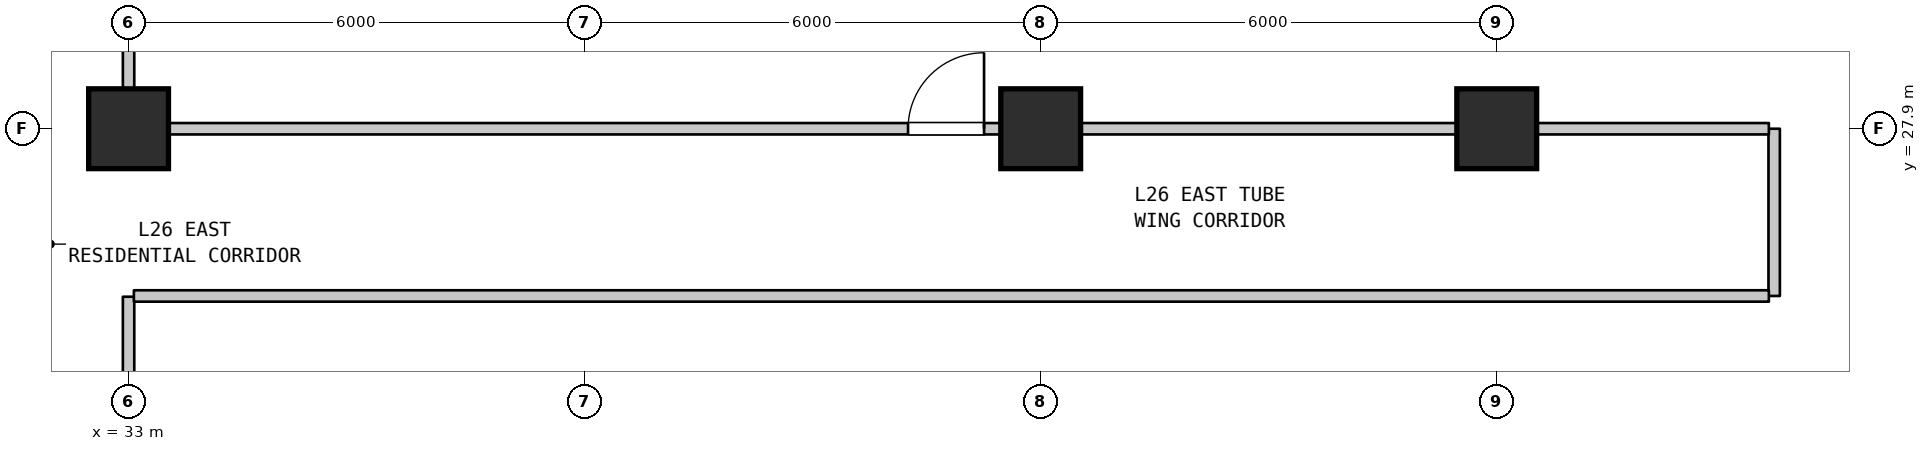
"""IFC4 building model, lengths in metres.
Left out: names, types, materials, properties, quantities, classifications, styles, units other than length and angle.
Written with IfcOpenShell. Run it as: python <this file> out.ifc"""

import sys

from ifc_helpers import new_model, si_unit, direction, frame, frame_2d, origin, origin_2d, place, context, subcontext, project, spatial, rectangle, extrude, element, fill, save


model = new_model("IFC4")
c1 = context("Model", 3, precision=1e-05, world=origin(), true_north=direction((0.0, 1.0)))
c2 = subcontext(c1, "Body", "Model", "MODEL_VIEW")
j1 = project(units=[si_unit("LENGTHUNIT", "METRE"), si_unit("PLANEANGLEUNIT", "RADIAN")], contexts=[c1])
p1 = place(None, origin())
s1 = spatial("IfcSite", under=j1, at=p1, CompositionType="ELEMENT")
p2 = place(p1, origin())
s2 = spatial("IfcBuilding", under=s1, at=p2, CompositionType="ELEMENT")
p3 = place(p2, frame((0.0, 0.0, 109.4)))
s3 = spatial("IfcBuildingStorey", under=s2, at=p3, CompositionType="ELEMENT", Elevation=109.4)
for number, where, z_axis, x_axis in (
    (1, (33.0, 27.9, 0.0), (0.0, 0.0, 1.0), (1.0, 0.0, 0.0)),
    (2, (45.0, 27.9, 0.0), (0.0, 0.0, 1.0), (1.0, 0.0, 0.0)),
    (3, (51.0, 27.9, 0.0), (0.0, 0.0, 1.0), (1.0, 0.0, 0.0)),
):
    element("IfcColumn", number, at=place(p3, frame(where, z_axis=z_axis, x_axis=x_axis)), inside=s3, PredefinedType="COLUMN", context=c2, shape_type="SweptSolid", body=[
        extrude(rectangle(XDim=1.05, YDim=1.05, at=origin_2d()), origin(), (0.0, 0.0, 1.0), 3.7),
    ])
p4 = place(p3, frame((33.0, 19.51, 0.0), z_axis=(0.0, 0.0, 1.0), x_axis=(0.0, 1.0, 0.0)))
e4 = element("IfcWall", 4, at=p4, inside=s3, PredefinedType="STANDARD", context=c2, shape_type="SweptSolid", body=[
    extrude(rectangle(XDim=6.18, YDim=0.15, at=frame_2d((3.09, 0.0))), origin(), (0.0, 0.0, 1.0), 2.935),
])
p5 = place(p3, frame((33.0, 27.91, 0.0), z_axis=(0.0, 0.0, 1.0), x_axis=(0.0, 1.0, 0.0)))
e5 = element("IfcWall", 5, at=p5, inside=s3, PredefinedType="STANDARD", context=c2, shape_type="SweptSolid", body=[
    extrude(rectangle(XDim=9.98, YDim=0.15, at=frame_2d((4.99, 0.0))), origin(), (0.0, 0.0, 1.0), 2.885),
])
p6 = place(p3, frame((54.65, 25.7, 0.0), z_axis=(0.0, 0.0, 1.0), x_axis=(0.0, 1.0, 0.0)))
e6 = element("IfcWall", 6, at=p6, inside=s3, PredefinedType="STANDARD", context=c2, shape_type="SweptSolid", body=[
    extrude(rectangle(XDim=2.2, YDim=0.15, at=frame_2d((1.1, 0.0))), origin(), (0.0, 0.0, 1.0), 3.385),
])
p7 = place(p3, frame((33.07, 25.7, 0.0), z_axis=(0.0, 0.0, 1.0), x_axis=(1.0, 0.0, 0.0)))
e7 = element("IfcWall", 7, at=p7, inside=s3, PredefinedType="STANDARD", context=c2, shape_type="SweptSolid", body=[
    extrude(rectangle(XDim=21.51, YDim=0.15, at=frame_2d((10.755, 0.0))), origin(), (0.0, 0.0, 1.0), 3.385),
])
p8 = place(p3, frame((33.07, 27.9, 0.0), z_axis=(0.0, 0.0, 1.0), x_axis=(1.0, 0.0, 0.0)))
e8 = element("IfcWall", 8, at=p8, inside=s3, PredefinedType="STANDARD", context=c2, shape_type="SweptSolid", body=[
    extrude(rectangle(XDim=11.93, YDim=0.15, at=frame_2d((5.965, 0.0))), origin(), (0.0, 0.0, 1.0), 2.885),
])
p9 = place(p8, frame((10.185, 0.0, 0.0)))
e9 = element("IfcOpeningElement", 9, at=p9, cuts=e8, PredefinedType="OPENING", context=c2, shape_type="SweptSolid", body=[
    extrude(rectangle(XDim=1.0, YDim=2.15, at=frame_2d((0.5, 1.075))), frame((0.0, 0.085, 0.0), z_axis=(0.0, -1.0, 0.0), x_axis=(1.0, 0.0, 0.0)), (0.0, 0.0, 1.0), 0.17),
])
p10 = place(p3, frame((45.0, 27.9, 0.0), z_axis=(0.0, 0.0, 1.0), x_axis=(1.0, 0.0, 0.0)))
e10 = element("IfcWall", 10, at=p10, inside=s3, PredefinedType="STANDARD", context=c2, shape_type="SweptSolid", body=[
    extrude(rectangle(XDim=9.58, YDim=0.15, at=frame_2d((4.79, 0.0))), origin(), (0.0, 0.0, 1.0), 2.935),
])
p11 = place(p9, origin())
e11 = element("IfcDoor", 11, at=p11, inside=s3, OperationType="SINGLE_SWING_RIGHT", PredefinedType="DOOR", context=c2, shape_type="SweptSolid", body=[
    extrude(rectangle(XDim=1.0, YDim=2.15, at=frame_2d((0.5, 1.075))), frame((0.0, 0.025, 0.0), z_axis=(0.0, -1.0, 0.0), x_axis=(1.0, 0.0, 0.0)), (0.0, 0.0, 1.0), 0.05),
])
fill(e9, e11)
save(model, sys.argv[1])
